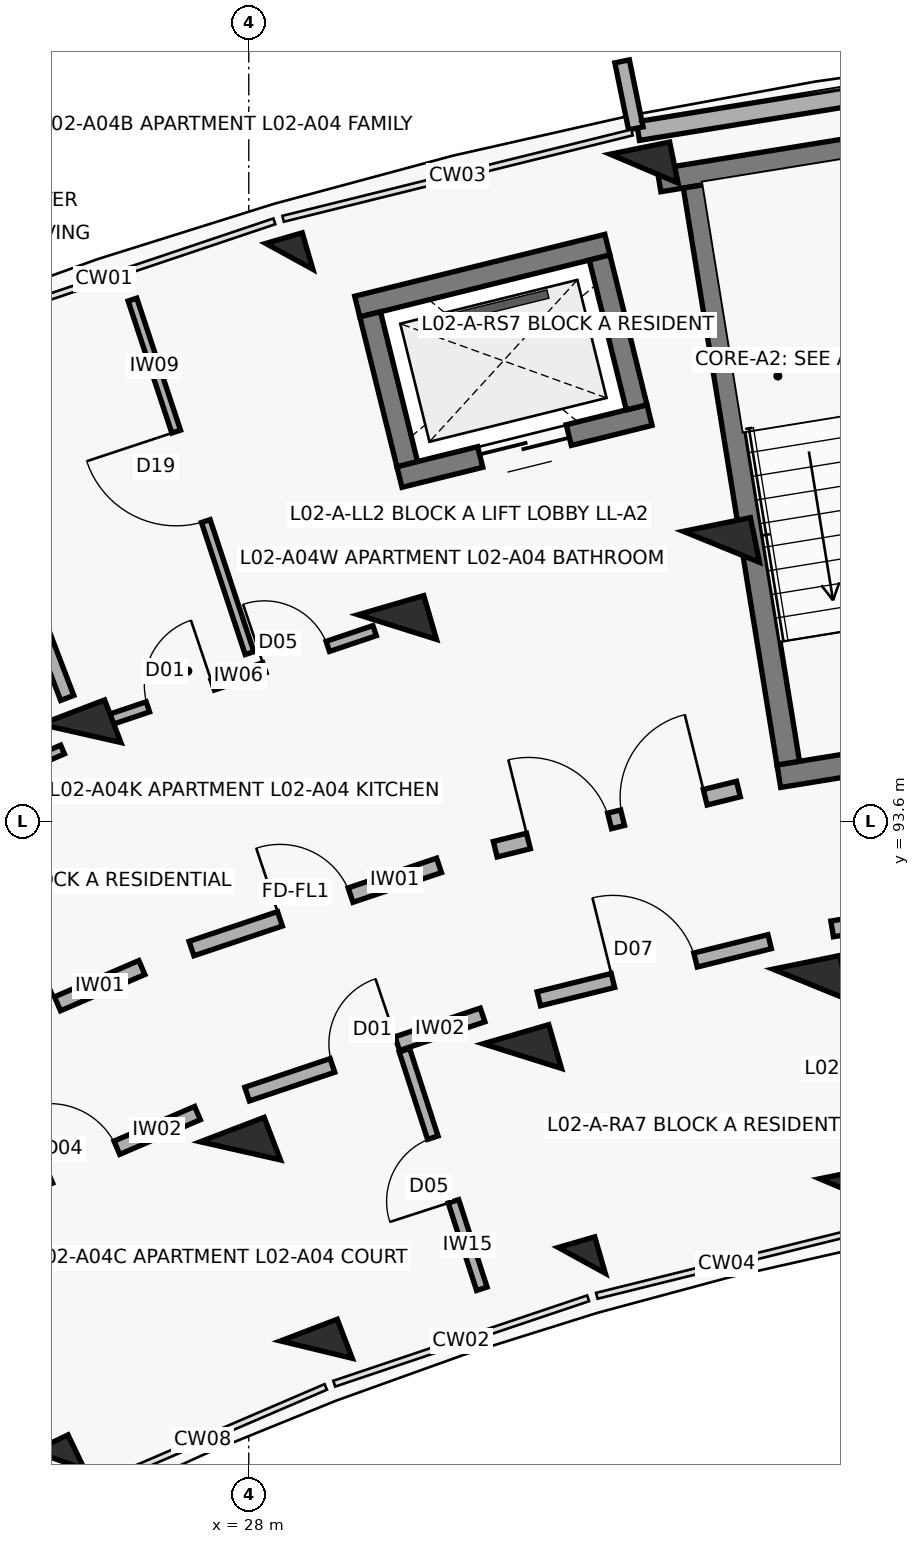
"""IFC4 building model, lengths in metres.
Left out: names, types, materials, properties, quantities, classifications, styles, units other than length and angle.
Written with IfcOpenShell. Run it as: python <this file> out.ifc"""

import sys

from ifc_helpers import new_model, si_unit, direction, frame, frame_2d, origin, origin_2d, place, context, subcontext, project, spatial, rectangle, extrude, element, fill, save


model = new_model("IFC4")
c1 = context("Model", 3, precision=1e-05, world=origin(), true_north=direction((0.0, 1.0)))
c2 = subcontext(c1, "Body", "Model", "MODEL_VIEW")
j1 = project(units=[si_unit("LENGTHUNIT", "METRE"), si_unit("PLANEANGLEUNIT", "RADIAN")], contexts=[c1])
p1 = place(None, origin())
s1 = spatial("IfcSite", under=j1, at=p1, CompositionType="ELEMENT")
p2 = place(p1, origin())
s2 = spatial("IfcBuilding", under=s1, at=p2, CompositionType="ELEMENT")
p3 = place(p2, frame((0.0, 0.0, 8.1)))
s3 = spatial("IfcBuildingStorey", under=s2, at=p3, CompositionType="ELEMENT", Elevation=8.1)
p4 = place(p3, frame((25.504, 85.191, 0.0), z_axis=(0.0, 0.0, 1.0), x_axis=(-0.432085748802, 0.901832526405, 0.0)))
e1 = element("IfcColumn", 1, at=p4, inside=s3, PredefinedType="COLUMN", context=c2, shape_type="SweptSolid", body=[
    extrude(rectangle(XDim=0.5, YDim=0.5, at=origin_2d()), origin(), (0.0, 0.0, 1.0), 3.1),
])
p5 = place(p3, frame((28.889, 86.646, 0.0), z_axis=(0.0, 0.0, 1.0), x_axis=(-0.357064076459, 0.934079892355, 0.0)))
e2 = element("IfcColumn", 2, at=p5, inside=s3, PredefinedType="COLUMN", context=c2, shape_type="SweptSolid", body=[
    extrude(rectangle(XDim=0.55, YDim=0.8, at=origin_2d()), origin(), (0.0, 0.0, 1.0), 3.1),
])
for number, where, z_axis, x_axis in (
    (3, (27.889, 89.261, 0.0), (0.0, 0.0, 1.0), (-0.357, 0.934, 0.0)),
    (4, (25.79, 94.753, 0.0), (0.0, 0.0, 1.0), (-0.357, 0.934, 0.0)),
):
    element("IfcColumn", number, at=place(p3, frame(where, z_axis=z_axis, x_axis=x_axis)), inside=s3, PredefinedType="COLUMN", context=c2, shape_type="SweptSolid", body=[
        extrude(rectangle(XDim=0.6, YDim=0.9, at=origin_2d()), origin(), (0.0, 0.0, 1.0), 3.1),
    ])
p6 = place(p3, frame((32.382, 87.82, 0.0), z_axis=(0.0, 0.0, 1.0), x_axis=(-0.27966144946, 0.96009867914, 0.0)))
e5 = element("IfcColumn", 5, at=p6, inside=s3, PredefinedType="COLUMN", context=c2, shape_type="SweptSolid", body=[
    extrude(rectangle(XDim=0.5, YDim=0.5, at=origin_2d()), origin(), (0.0, 0.0, 1.0), 3.1),
])
for number, where, z_axis, x_axis in (
    (6, (31.599, 90.508, 0.0), (0.0, 0.0, 1.0), (-0.28, 0.96, 0.0)),
    (7, (29.954, 96.153, 0.0), (0.0, 0.0, 1.0), (-0.28, 0.96, 0.0)),
):
    element("IfcColumn", number, at=place(p3, frame(where, z_axis=z_axis, x_axis=x_axis)), inside=s3, PredefinedType="COLUMN", context=c2, shape_type="SweptSolid", body=[
        extrude(rectangle(XDim=0.6, YDim=0.9, at=origin_2d()), origin(), (0.0, 0.0, 1.0), 3.1),
    ])
p7 = place(p3, frame((28.533, 101.031, 0.0), z_axis=(0.0, 0.0, 1.0), x_axis=(-0.27966144946, 0.96009867914, 0.0)))
e8 = element("IfcColumn", 8, at=p7, inside=s3, PredefinedType="COLUMN", context=c2, shape_type="SweptSolid", body=[
    extrude(rectangle(XDim=0.5, YDim=0.5, at=origin_2d()), origin(), (0.0, 0.0, 1.0), 3.1),
])
p8 = place(p3, frame((35.958, 88.705, 0.0), z_axis=(0.0, 0.0, 1.0), x_axis=(-0.200393999665, 0.979715389742, 0.0)))
e9 = element("IfcColumn", 9, at=p8, inside=s3, PredefinedType="COLUMN", context=c2, shape_type="SweptSolid", body=[
    extrude(rectangle(XDim=0.55, YDim=0.8, at=origin_2d()), origin(), (0.0, 0.0, 1.0), 3.1),
])
for number, where, z_axis, x_axis in (
    (10, (35.397, 91.448, 0.0), (0.0, 0.0, 1.0), (-0.2, 0.98, 0.0)),
    (11, (34.219, 97.209, 0.0), (0.0, 0.0, 1.0), (-0.2, 0.98, 0.0)),
):
    element("IfcColumn", number, at=place(p3, frame(where, z_axis=z_axis, x_axis=x_axis)), inside=s3, PredefinedType="COLUMN", context=c2, shape_type="SweptSolid", body=[
        extrude(rectangle(XDim=0.6, YDim=0.9, at=origin_2d()), origin(), (0.0, 0.0, 1.0), 3.1),
    ])
p9 = place(p3, frame((33.201, 102.186, 0.0), z_axis=(0.0, 0.0, 1.0), x_axis=(-0.200393999665, 0.979715389742, 0.0)))
e12 = element("IfcColumn", 12, at=p9, inside=s3, PredefinedType="COLUMN", context=c2, shape_type="SweptSolid", body=[
    extrude(rectangle(XDim=0.55, YDim=0.8, at=origin_2d()), origin(), (0.0, 0.0, 1.0), 3.1),
])
p10 = place(p3, frame((33.12, 102.679, 0.0), z_axis=(0.0, 0.0, 1.0), x_axis=(0.987080750493, 0.160223568819, 0.0)))
e13 = element("IfcWall", 13, at=p10, inside=s3, PredefinedType="SOLIDWALL", context=c2, shape_type="SweptSolid", body=[
    extrude(rectangle(XDim=4.809, YDim=0.248, at=frame_2d((2.404, 0.0))), origin(), (0.0, 0.0, 1.0), 2.25),
])
p11 = place(p3, frame((33.093, 102.715, 0.0), z_axis=(0.0, 0.0, 1.0), x_axis=(-0.200183211319, 0.979758481416, 0.0)))
e14 = element("IfcWall", 14, at=p11, inside=s3, PredefinedType="PARAPET", context=c2, shape_type="SweptSolid", body=[
    extrude(rectangle(XDim=0.9, YDim=0.195, at=frame_2d((0.45, 0.0))), origin(), (0.0, 0.0, 1.0), 2.25),
])
p12 = place(p3, frame((38.794, 94.811, 0.0), z_axis=(0.0, 0.0, 1.0), x_axis=(-0.987077443397, -0.160243941341, 0.0)))
e15 = element("IfcWall", 15, at=p12, inside=s3, PredefinedType="SHEAR", context=c2, shape_type="SweptSolid", body=[
    extrude(rectangle(XDim=3.87, YDim=0.3, at=frame_2d((1.935, 0.0))), origin(), (0.0, 0.0, 1.0), 3.1),
])
p13 = place(p12, frame((1.41, 0.0, 0.0)))
e16 = element("IfcOpeningElement", 16, at=p13, cuts=e15, PredefinedType="OPENING", context=c2, shape_type="SweptSolid", body=[
    extrude(rectangle(XDim=1.05, YDim=2.15, at=frame_2d((0.525, 1.075))), frame((0.0, 0.16, 0.0), z_axis=(0.0, -1.0, 0.0), x_axis=(1.0, 0.0, 0.0)), (0.0, 0.0, 1.0), 0.32),
])
p14 = place(p3, frame((37.81, 102.745, 0.0), z_axis=(0.0, 0.0, 1.0), x_axis=(-0.987084710126, -0.160199173019, 0.0)))
e17 = element("IfcWall", 17, at=p14, inside=s3, PredefinedType="SHEAR", context=c2, shape_type="SweptSolid", body=[
    extrude(rectangle(XDim=4.47, YDim=0.3, at=frame_2d((2.235, 0.0))), origin(), (0.0, 0.0, 1.0), 3.1),
])
p15 = place(p3, frame((35.098, 94.363, 0.0), z_axis=(0.0, 0.0, 1.0), x_axis=(-0.160227496777, 0.987080112897, 0.0)))
e18 = element("IfcWall", 18, at=p15, inside=s3, PredefinedType="SHEAR", context=c2, shape_type="SweptSolid", body=[
    extrude(rectangle(XDim=7.69, YDim=0.3, at=frame_2d((3.845, 0.0))), origin(), (0.0, 0.0, 1.0), 3.1),
])
p16 = place(p3, frame((33.273, 98.942, 0.0), z_axis=(0.0, 0.0, 1.0), x_axis=(-0.970707542441, -0.240264160972, 0.0)))
e19 = element("IfcWall", 19, at=p16, inside=s3, PredefinedType="SHEAR", context=c2, shape_type="SweptSolid", body=[
    extrude(rectangle(XDim=3.39, YDim=0.28, at=frame_2d((1.695, 0.0))), origin(), (0.0, 0.0, 1.0), 3.1),
])
p17 = place(p16, frame((1.095, 0.0, 0.0)))
e20 = element("IfcOpeningElement", 20, at=p17, cuts=e19, PredefinedType="OPENING", context=c2, shape_type="SweptSolid", body=[
    extrude(rectangle(XDim=1.2, YDim=2.15, at=frame_2d((0.6, 1.075))), frame((0.0, 0.15, 0.0), z_axis=(0.0, -1.0, 0.0), x_axis=(1.0, 0.0, 0.0)), (0.0, 0.0, 1.0), 0.3),
])
p18 = place(p3, frame((32.718, 101.185, 0.0), z_axis=(0.0, 0.0, 1.0), x_axis=(-0.970711699588, -0.240247364777, 0.0)))
e21 = element("IfcWall", 21, at=p18, inside=s3, PredefinedType="SHEAR", context=c2, shape_type="SweptSolid", body=[
    extrude(rectangle(XDim=3.39, YDim=0.28, at=frame_2d((1.695, 0.0))), origin(), (0.0, 0.0, 1.0), 3.1),
])
p19 = place(p3, frame((33.104, 99.044, 0.0), z_axis=(0.0, 0.0, 1.0), x_axis=(-0.240186044774, 0.970726873995, 0.0)))
e22 = element("IfcWall", 22, at=p19, inside=s3, PredefinedType="SHEAR", context=c2, shape_type="SweptSolid", body=[
    extrude(rectangle(XDim=2.03, YDim=0.28, at=frame_2d((1.015, 0.0))), origin(), (0.0, 0.0, 1.0), 3.1),
])
p20 = place(p3, frame((30.085, 98.297, 0.0), z_axis=(0.0, 0.0, 1.0), x_axis=(-0.2402993748, 0.970698825832, 0.0)))
e23 = element("IfcWall", 23, at=p20, inside=s3, PredefinedType="SHEAR", context=c2, shape_type="SweptSolid", body=[
    extrude(rectangle(XDim=2.03, YDim=0.28, at=frame_2d((1.015, 0.0))), origin(), (0.0, 0.0, 1.0), 3.1),
])
p21 = place(p3, frame((23.437, 90.316, 0.0), z_axis=(0.0, 0.0, 1.0), x_axis=(0.918718172399, 0.394913813008, 0.0)))
e24 = element("IfcWall", 24, at=p21, inside=s3, PredefinedType="SOLIDWALL", context=c2, shape_type="SweptSolid", body=[
    extrude(rectangle(XDim=3.436, YDim=0.2, at=frame_2d((1.718, 0.0))), origin(), (0.0, 0.0, 1.0), 2.08),
])
p22 = place(p21, frame((1.208, 0.0, 0.0)))
e25 = element("IfcOpeningElement", 25, at=p22, cuts=e24, PredefinedType="OPENING", context=c2, shape_type="SweptSolid", body=[
    extrude(rectangle(XDim=1.02, YDim=2.15, at=frame_2d((0.51, 1.075))), frame((0.0, 0.11, 0.0), z_axis=(0.0, -1.0, 0.0), x_axis=(1.0, 0.0, 0.0)), (0.0, 0.0, 1.0), 0.22),
])
p23 = place(p3, frame((24.322, 88.467, 0.0), z_axis=(0.0, 0.0, 1.0), x_axis=(0.918723391052, 0.394901672235, 0.0)))
e26 = element("IfcWall", 26, at=p23, inside=s3, PredefinedType="SOLIDWALL", context=c2, shape_type="SweptSolid", body=[
    extrude(rectangle(XDim=3.269, YDim=0.19, at=frame_2d((1.634, 0.0))), origin(), (0.0, 0.0, 1.0), 2.08),
])
p24 = place(p23, frame((1.154, 0.0, 0.0)))
e27 = element("IfcOpeningElement", 27, at=p24, cuts=e26, PredefinedType="OPENING", context=c2, shape_type="SweptSolid", body=[
    extrude(rectangle(XDim=0.96, YDim=2.1, at=frame_2d((0.48, 1.05))), frame((0.0, 0.105, 0.0), z_axis=(0.0, -1.0, 0.0), x_axis=(1.0, 0.0, 0.0)), (0.0, 0.0, 1.0), 0.21),
])
p25 = place(p3, frame((22.073, 93.047, 0.0), z_axis=(0.0, 0.0, 1.0), x_axis=(0.918737522346, 0.394868794707, 0.0)))
e28 = element("IfcWall", 28, at=p25, inside=s3, PredefinedType="PARTITIONING", context=c2, shape_type="SweptSolid", body=[
    extrude(rectangle(XDim=3.785, YDim=0.125, at=frame_2d((1.893, 0.0))), origin(), (0.0, 0.0, 1.0), 2.08),
])
p26 = place(p25, frame((0.65, 0.0, 0.0)))
e29 = element("IfcOpeningElement", 29, at=p26, cuts=e28, PredefinedType="OPENING", context=c2, shape_type="SweptSolid", body=[
    extrude(rectangle(XDim=0.9, YDim=2.1, at=frame_2d((0.45, 1.05))), frame((0.0, 0.073, 0.0), z_axis=(0.0, -1.0, 0.0), x_axis=(1.0, 0.0, 0.0)), (0.0, 0.0, 1.0), 0.145),
])
p27 = place(p25, frame((2.255, 0.0, 0.0)))
e30 = element("IfcOpeningElement", 30, at=p27, cuts=e28, PredefinedType="OPENING", context=c2, shape_type="SweptSolid", body=[
    extrude(rectangle(XDim=0.88, YDim=2.1, at=frame_2d((0.44, 1.05))), frame((0.0, 0.073, 0.0), z_axis=(0.0, -1.0, 0.0), x_axis=(1.0, 0.0, 0.0)), (0.0, 0.0, 1.0), 0.145),
])
p28 = place(p3, frame((27.247, 91.923, 0.0), z_axis=(0.0, 0.0, 1.0), x_axis=(0.947863007629, 0.318678080151, 0.0)))
e31 = element("IfcWall", 31, at=p28, inside=s3, PredefinedType="SOLIDWALL", context=c2, shape_type="SweptSolid", body=[
    extrude(rectangle(XDim=3.436, YDim=0.2, at=frame_2d((1.718, 0.0))), origin(), (0.0, 0.0, 1.0), 2.08),
])
p29 = place(p28, frame((1.228, 0.0, 0.0)))
e32 = element("IfcOpeningElement", 32, at=p29, cuts=e31, PredefinedType="OPENING", context=c2, shape_type="SweptSolid", body=[
    extrude(rectangle(XDim=0.98, YDim=2.15, at=frame_2d((0.49, 1.075))), frame((0.0, 0.11, 0.0), z_axis=(0.0, -1.0, 0.0), x_axis=(1.0, 0.0, 0.0)), (0.0, 0.0, 1.0), 0.22),
])
p30 = place(p3, frame((27.979, 90.008, 0.0), z_axis=(0.0, 0.0, 1.0), x_axis=(0.94787351033, 0.318646839643, 0.0)))
e33 = element("IfcWall", 33, at=p30, inside=s3, PredefinedType="SOLIDWALL", context=c2, shape_type="SweptSolid", body=[
    extrude(rectangle(XDim=3.269, YDim=0.19, at=frame_2d((1.634, 0.0))), origin(), (0.0, 0.0, 1.0), 2.08),
])
p31 = place(p30, frame((1.184, 0.0, 0.0)))
e34 = element("IfcOpeningElement", 34, at=p31, cuts=e33, PredefinedType="OPENING", context=c2, shape_type="SweptSolid", body=[
    extrude(rectangle(XDim=0.9, YDim=2.1, at=frame_2d((0.45, 1.05))), frame((0.0, 0.105, 0.0), z_axis=(0.0, -1.0, 0.0), x_axis=(1.0, 0.0, 0.0)), (0.0, 0.0, 1.0), 0.21),
])
p32 = place(p3, frame((31.066, 87.446, 0.0), z_axis=(0.0, 0.0, 1.0), x_axis=(-0.308582493915, 0.951197584337, 0.0)))
e35 = element("IfcWall", 35, at=p32, inside=s3, PredefinedType="PARTITIONING", context=c2, shape_type="SweptSolid", body=[
    extrude(rectangle(XDim=3.3, YDim=0.145, at=frame_2d((1.65, 0.0))), origin(), (0.0, 0.0, 1.0), 2.08),
])
p33 = place(p32, frame((1.21, 0.0, 0.0)))
e36 = element("IfcOpeningElement", 36, at=p33, cuts=e35, PredefinedType="OPENING", context=c2, shape_type="SweptSolid", body=[
    extrude(rectangle(XDim=0.88, YDim=2.1, at=frame_2d((0.44, 1.05))), frame((0.0, 0.083, 0.0), z_axis=(0.0, -1.0, 0.0), x_axis=(1.0, 0.0, 0.0)), (0.0, 0.0, 1.0), 0.165),
])
p34 = place(p3, frame((26.056, 94.896, 0.0), z_axis=(0.0, 0.0, 1.0), x_axis=(0.947876567739, 0.318637744673, 0.0)))
e37 = element("IfcWall", 37, at=p34, inside=s3, PredefinedType="PARTITIONING", context=c2, shape_type="SweptSolid", body=[
    extrude(rectangle(XDim=3.797, YDim=0.14, at=frame_2d((1.899, 0.0))), origin(), (0.0, 0.0, 1.0), 2.08),
])
p35 = place(p34, frame((0.65, 0.0, 0.0)))
e38 = element("IfcOpeningElement", 38, at=p35, cuts=e37, PredefinedType="OPENING", context=c2, shape_type="SweptSolid", body=[
    extrude(rectangle(XDim=0.9, YDim=2.1, at=frame_2d((0.45, 1.05))), frame((0.0, 0.08, 0.0), z_axis=(0.0, -1.0, 0.0), x_axis=(1.0, 0.0, 0.0)), (0.0, 0.0, 1.0), 0.16),
])
p36 = place(p34, frame((2.267, 0.0, 0.0)))
e39 = element("IfcOpeningElement", 39, at=p36, cuts=e37, PredefinedType="OPENING", context=c2, shape_type="SweptSolid", body=[
    extrude(rectangle(XDim=0.88, YDim=2.1, at=frame_2d((0.44, 1.05))), frame((0.0, 0.08, 0.0), z_axis=(0.0, -1.0, 0.0), x_axis=(1.0, 0.0, 0.0)), (0.0, 0.0, 1.0), 0.16),
])
p37 = place(p3, frame((28.01, 95.81, 0.0), z_axis=(0.0, 0.0, 1.0), x_axis=(-0.314343770763, 0.949309219266, 0.0)))
e40 = element("IfcWall", 40, at=p37, inside=s3, PredefinedType="PARTITIONING", context=c2, shape_type="SweptSolid", body=[
    extrude(rectangle(XDim=4.9, YDim=0.12, at=frame_2d((2.45, 0.0))), origin(), (0.0, 0.0, 1.0), 2.08),
])
p38 = place(p37, frame((1.83, 0.0, 0.0)))
e41 = element("IfcOpeningElement", 41, at=p38, cuts=e40, PredefinedType="OPENING", context=c2, shape_type="SweptSolid", body=[
    extrude(rectangle(XDim=1.24, YDim=2.1, at=frame_2d((0.62, 1.05))), frame((0.0, 0.07, 0.0), z_axis=(0.0, -1.0, 0.0), x_axis=(1.0, 0.0, 0.0)), (0.0, 0.0, 1.0), 0.14),
])
p39 = place(p3, frame((25.611, 95.22, 0.0), z_axis=(0.0, 0.0, 1.0), x_axis=(-0.357064016205, 0.934079915388, 0.0)))
e42 = element("IfcWall", 42, at=p39, inside=s3, PredefinedType="SOLIDWALL", context=c2, shape_type="SweptSolid", body=[
    extrude(rectangle(XDim=4.35, YDim=0.185, at=frame_2d((2.175, 0.0))), origin(), (0.0, 0.0, 1.0), 2.08),
])
p40 = place(p3, frame((31.243, 93.23, 0.0), z_axis=(0.0, 0.0, 1.0), x_axis=(0.970719238682, 0.240216901263, 0.0)))
e43 = element("IfcWall", 43, at=p40, inside=s3, PredefinedType="SOLIDWALL", context=c2, shape_type="SweptSolid", body=[
    extrude(rectangle(XDim=3.296, YDim=0.21, at=frame_2d((1.648, 0.0))), origin(), (0.0, 0.0, 1.0), 2.08),
])
p41 = place(p40, frame((0.45, 0.0, 0.0)))
e44 = element("IfcOpeningElement", 44, at=p41, cuts=e43, PredefinedType="OPENING", context=c2, shape_type="SweptSolid", body=[
    extrude(rectangle(XDim=1.1, YDim=2.15, at=frame_2d((0.55, 1.075))), frame((0.0, 0.115, 0.0), z_axis=(0.0, -1.0, 0.0), x_axis=(1.0, 0.0, 0.0)), (0.0, 0.0, 1.0), 0.23),
])
p42 = place(p40, frame((1.726, 0.0, 0.0)))
e45 = element("IfcOpeningElement", 45, at=p42, cuts=e43, PredefinedType="OPENING", context=c2, shape_type="SweptSolid", body=[
    extrude(rectangle(XDim=1.12, YDim=2.15, at=frame_2d((0.56, 1.075))), frame((0.0, 0.115, 0.0), z_axis=(0.0, -1.0, 0.0), x_axis=(1.0, 0.0, 0.0)), (0.0, 0.0, 1.0), 0.23),
])
p43 = place(p3, frame((31.816, 91.262, 0.0), z_axis=(0.0, 0.0, 1.0), x_axis=(0.970727194092, 0.240184751078, 0.0)))
e46 = element("IfcWall", 46, at=p43, inside=s3, PredefinedType="SOLIDWALL", context=c2, shape_type="SweptSolid", body=[
    extrude(rectangle(XDim=3.129, YDim=0.19, at=frame_2d((1.564, 0.0))), origin(), (0.0, 0.0, 1.0), 2.08),
])
p44 = place(p43, frame((1.004, 0.0, 0.0)))
e47 = element("IfcOpeningElement", 47, at=p44, cuts=e46, PredefinedType="OPENING", context=c2, shape_type="SweptSolid", body=[
    extrude(rectangle(XDim=1.12, YDim=2.15, at=frame_2d((0.56, 1.075))), frame((0.0, 0.105, 0.0), z_axis=(0.0, -1.0, 0.0), x_axis=(1.0, 0.0, 0.0)), (0.0, 0.0, 1.0), 0.21),
])
p45 = place(p3, frame((35.676, 92.181, 0.0), z_axis=(0.0, 0.0, 1.0), x_axis=(0.98707079686, 0.160284877599, 0.0)))
e48 = element("IfcWall", 48, at=p45, inside=s3, PredefinedType="SOLIDWALL", context=c2, shape_type="SweptSolid", body=[
    extrude(rectangle(XDim=3.129, YDim=0.21, at=frame_2d((1.564, 0.0))), origin(), (0.0, 0.0, 1.0), 2.08),
])
p46 = place(p45, frame((1.014, 0.0, 0.0)))
e49 = element("IfcOpeningElement", 49, at=p46, cuts=e48, PredefinedType="OPENING", context=c2, shape_type="SweptSolid", body=[
    extrude(rectangle(XDim=1.1, YDim=2.15, at=frame_2d((0.55, 1.075))), frame((0.0, 0.115, 0.0), z_axis=(0.0, -1.0, 0.0), x_axis=(1.0, 0.0, 0.0)), (0.0, 0.0, 1.0), 0.23),
])
p47 = place(p17, origin())
e50 = element("IfcDoor", 50, at=p47, inside=s3, OperationType="DOUBLE_DOOR_SLIDING", PredefinedType="DOOR", context=c2, shape_type="SweptSolid", body=[
    extrude(rectangle(XDim=1.2, YDim=2.15, at=frame_2d((0.6, 1.075))), frame((0.0, 0.025, 0.0), z_axis=(0.0, -1.0, 0.0), x_axis=(1.0, 0.0, 0.0)), (0.0, 0.0, 1.0), 0.05),
])
fill(e20, e50)
p48 = place(p22, origin())
e51 = element("IfcDoor", 51, at=p48, inside=s3, OperationType="SINGLE_SWING_RIGHT", PredefinedType="DOOR", context=c2, shape_type="SweptSolid", body=[
    extrude(rectangle(XDim=1.02, YDim=2.15, at=frame_2d((0.51, 1.075))), frame((0.0, 0.025, 0.0), z_axis=(0.0, -1.0, 0.0), x_axis=(1.0, 0.0, 0.0)), (0.0, 0.0, 1.0), 0.05),
])
fill(e25, e51)
p49 = place(p24, origin())
e52 = element("IfcDoor", 52, at=p49, inside=s3, OperationType="SINGLE_SWING_LEFT", PredefinedType="DOOR", context=c2, shape_type="SweptSolid", body=[
    extrude(rectangle(XDim=0.96, YDim=2.1, at=frame_2d((0.48, 1.05))), frame((0.0, 0.025, 0.0), z_axis=(0.0, -1.0, 0.0), x_axis=(1.0, 0.0, 0.0)), (0.0, 0.0, 1.0), 0.05),
])
fill(e27, e52)
p50 = place(p29, origin())
e53 = element("IfcDoor", 53, at=p50, inside=s3, OperationType="SINGLE_SWING_LEFT", PredefinedType="DOOR", context=c2, shape_type="SweptSolid", body=[
    extrude(rectangle(XDim=0.98, YDim=2.15, at=frame_2d((0.49, 1.075))), frame((0.0, 0.025, 0.0), z_axis=(0.0, -1.0, 0.0), x_axis=(1.0, 0.0, 0.0)), (0.0, 0.0, 1.0), 0.05),
])
fill(e32, e53)
p51 = place(p31, origin())
e54 = element("IfcDoor", 54, at=p51, inside=s3, OperationType="SINGLE_SWING_RIGHT", PredefinedType="DOOR", context=c2, shape_type="SweptSolid", body=[
    extrude(rectangle(XDim=0.9, YDim=2.1, at=frame_2d((0.45, 1.05))), frame((0.0, 0.025, 0.0), z_axis=(0.0, -1.0, 0.0), x_axis=(1.0, 0.0, 0.0)), (0.0, 0.0, 1.0), 0.05),
])
fill(e34, e54)
p52 = place(p33, origin())
e55 = element("IfcDoor", 55, at=p52, inside=s3, OperationType="SINGLE_SWING_LEFT", PredefinedType="DOOR", context=c2, shape_type="SweptSolid", body=[
    extrude(rectangle(XDim=0.88, YDim=2.1, at=frame_2d((0.44, 1.05))), frame((0.0, 0.025, 0.0), z_axis=(0.0, -1.0, 0.0), x_axis=(1.0, 0.0, 0.0)), (0.0, 0.0, 1.0), 0.05),
])
fill(e36, e55)
p53 = place(p35, origin())
e56 = element("IfcDoor", 56, at=p53, inside=s3, OperationType="SINGLE_SWING_RIGHT", PredefinedType="DOOR", context=c2, shape_type="SweptSolid", body=[
    extrude(rectangle(XDim=0.9, YDim=2.1, at=frame_2d((0.45, 1.05))), frame((0.0, 0.025, 0.0), z_axis=(0.0, -1.0, 0.0), x_axis=(1.0, 0.0, 0.0)), (0.0, 0.0, 1.0), 0.05),
])
fill(e38, e56)
p54 = place(p36, origin())
e57 = element("IfcDoor", 57, at=p54, inside=s3, OperationType="SINGLE_SWING_LEFT", PredefinedType="DOOR", context=c2, shape_type="SweptSolid", body=[
    extrude(rectangle(XDim=0.88, YDim=2.1, at=frame_2d((0.44, 1.05))), frame((0.0, 0.025, 0.0), z_axis=(0.0, -1.0, 0.0), x_axis=(1.0, 0.0, 0.0)), (0.0, 0.0, 1.0), 0.05),
])
fill(e39, e57)
p55 = place(p38, origin())
e58 = element("IfcDoor", 58, at=p55, inside=s3, OperationType="SINGLE_SWING_RIGHT", PredefinedType="DOOR", context=c2, shape_type="SweptSolid", body=[
    extrude(rectangle(XDim=1.24, YDim=2.1, at=frame_2d((0.62, 1.05))), frame((0.0, 0.025, 0.0), z_axis=(0.0, -1.0, 0.0), x_axis=(1.0, 0.0, 0.0)), (0.0, 0.0, 1.0), 0.05),
])
fill(e41, e58)
p56 = place(p41, origin())
e59 = element("IfcDoor", 59, at=p56, inside=s3, OperationType="SINGLE_SWING_LEFT", PredefinedType="DOOR", context=c2, shape_type="SweptSolid", body=[
    extrude(rectangle(XDim=1.1, YDim=2.15, at=frame_2d((0.55, 1.075))), frame((0.0, 0.025, 0.0), z_axis=(0.0, -1.0, 0.0), x_axis=(1.0, 0.0, 0.0)), (0.0, 0.0, 1.0), 0.05),
])
fill(e44, e59)
p57 = place(p42, origin())
e60 = element("IfcDoor", 60, at=p57, inside=s3, OperationType="SINGLE_SWING_RIGHT", PredefinedType="DOOR", context=c2, shape_type="SweptSolid", body=[
    extrude(rectangle(XDim=1.12, YDim=2.15, at=frame_2d((0.56, 1.075))), frame((0.0, 0.025, 0.0), z_axis=(0.0, -1.0, 0.0), x_axis=(1.0, 0.0, 0.0)), (0.0, 0.0, 1.0), 0.05),
])
fill(e45, e60)
p58 = place(p44, origin())
e61 = element("IfcDoor", 61, at=p58, inside=s3, OperationType="SINGLE_SWING_LEFT", PredefinedType="DOOR", context=c2, shape_type="SweptSolid", body=[
    extrude(rectangle(XDim=1.12, YDim=2.15, at=frame_2d((0.56, 1.075))), frame((0.0, 0.025, 0.0), z_axis=(0.0, -1.0, 0.0), x_axis=(1.0, 0.0, 0.0)), (0.0, 0.0, 1.0), 0.05),
])
fill(e47, e61)
save(model, sys.argv[1])
